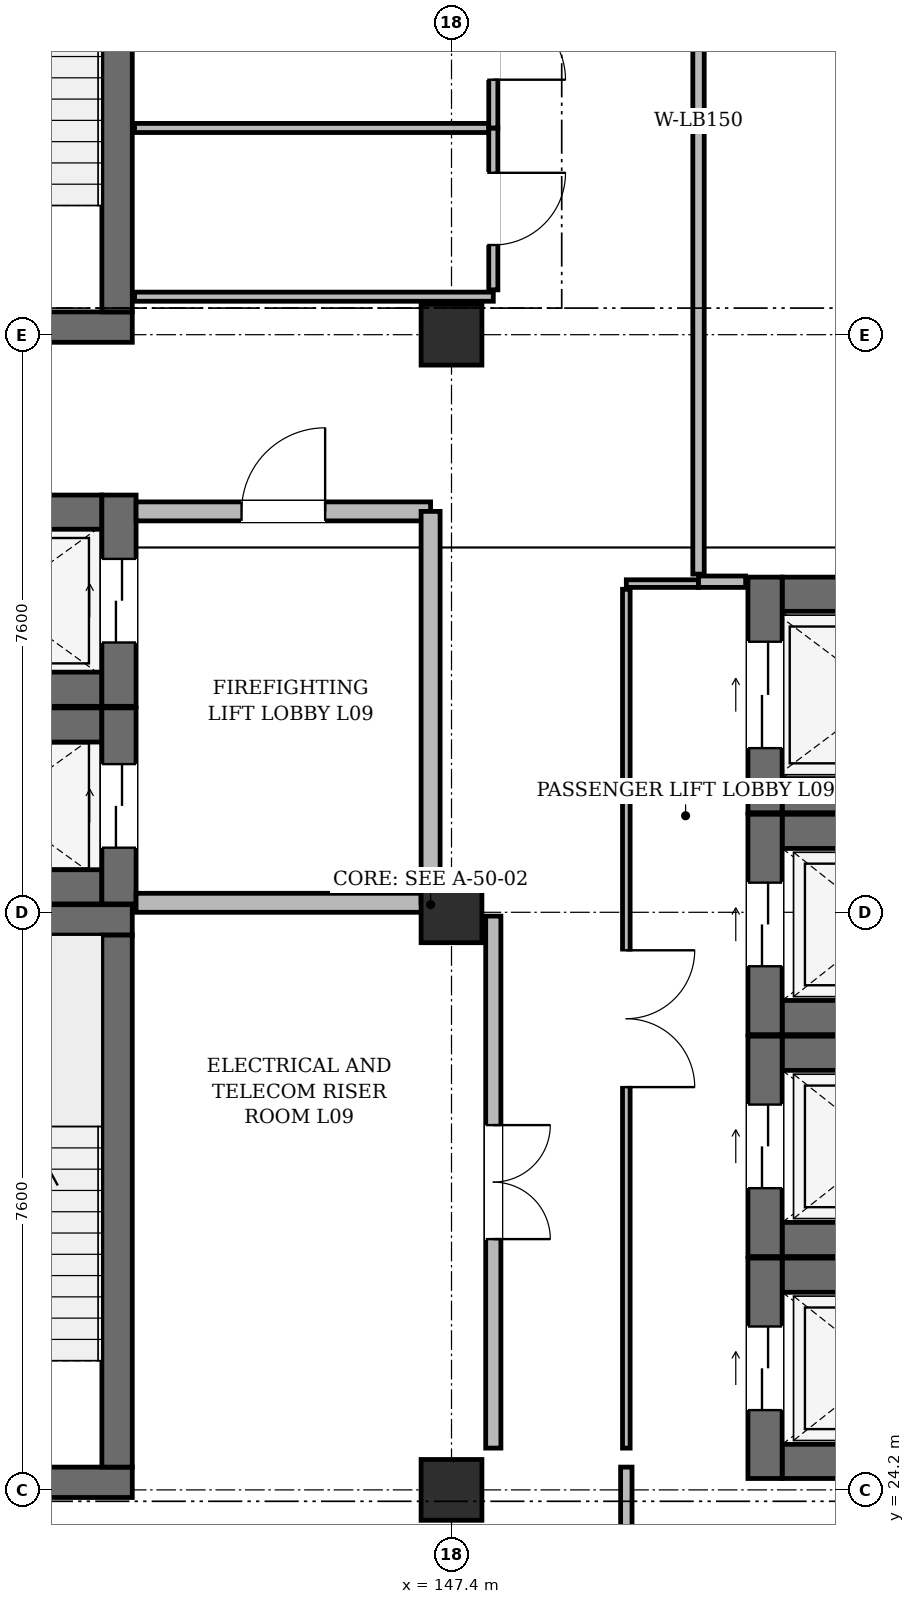
"""IFC4 building model, lengths in metres.
Left out: names, types, materials, properties, quantities, classifications, styles, units other than length and angle.
Written with IfcOpenShell. Run it as: python <this file> out.ifc"""

import sys

from ifc_helpers import new_model, si_unit, direction, frame, frame_2d, origin, origin_2d, place, context, subcontext, project, spatial, rectangle, extrude, element, fill, save


model = new_model("IFC4")
c1 = context("Model", 3, precision=1e-05, world=origin(), true_north=direction((0.0, 1.0)))
c2 = subcontext(c1, "Body", "Model", "MODEL_VIEW")
j1 = project(units=[si_unit("LENGTHUNIT", "METRE"), si_unit("PLANEANGLEUNIT", "RADIAN")], contexts=[c1])
p1 = place(None, origin())
s1 = spatial("IfcSite", under=j1, at=p1, CompositionType="ELEMENT")
p2 = place(p1, origin())
s2 = spatial("IfcBuilding", under=s1, at=p2, CompositionType="ELEMENT")
p3 = place(p2, frame((0.0, 0.0, 40.8)))
s3 = spatial("IfcBuildingStorey", under=s2, at=p3, CompositionType="ELEMENT", Elevation=40.8)
for number, where, z_axis, x_axis in (
    (1, (147.4, 24.2, 0.0), (0.0, 0.0, 1.0), (1.0, 0.0, 0.0)),
    (2, (147.4, 31.8, 0.0), (0.0, 0.0, 1.0), (1.0, 0.0, 0.0)),
    (3, (147.4, 39.4, 0.0), (0.0, 0.0, 1.0), (1.0, 0.0, 0.0)),
):
    element("IfcColumn", number, at=place(p3, frame(where, z_axis=z_axis, x_axis=x_axis)), inside=s3, PredefinedType="COLUMN", context=c2, shape_type="SweptSolid", body=[
        extrude(rectangle(XDim=0.8, YDim=0.8, at=origin_2d()), origin(), (0.0, 0.0, 1.0), 3.94),
    ])
p4 = place(p3, frame((139.4, 24.3, 0.0), z_axis=(0.0, 0.0, 1.0), x_axis=(1.0, 0.0, 0.0)))
e4 = element("IfcWall", 4, at=p4, inside=s3, PredefinedType="SHEAR", context=c2, shape_type="SweptSolid", body=[
    extrude(rectangle(XDim=3.8, YDim=0.4, at=frame_2d((1.9, 0.0))), origin(), (0.0, 0.0, 1.0), 3.94),
])
p5 = place(p4, frame((1.3, 0.0, 0.0)))
e5 = element("IfcOpeningElement", 5, at=p5, cuts=e4, PredefinedType="OPENING", context=c2, shape_type="SweptSolid", body=[
    extrude(rectangle(XDim=1.2, YDim=2.2, at=frame_2d((0.6, 1.1))), frame((0.0, 0.212, 0.0), z_axis=(0.0, -1.0, 0.0), x_axis=(1.0, 0.0, 0.0)), (0.0, 0.0, 1.0), 0.424),
])
p6 = place(p3, frame((139.4, 31.7, 0.0), z_axis=(0.0, 0.0, 1.0), x_axis=(1.0, 0.0, 0.0)))
e6 = element("IfcWall", 6, at=p6, inside=s3, PredefinedType="SHEAR", context=c2, shape_type="SweptSolid", body=[
    extrude(rectangle(XDim=3.8, YDim=0.4, at=frame_2d((1.9, 0.0))), origin(), (0.0, 0.0, 1.0), 3.94),
])
p7 = place(p3, frame((143.0, 24.5, 0.0), z_axis=(0.0, 0.0, 1.0), x_axis=(0.0, 1.0, 0.0)))
e7 = element("IfcWall", 7, at=p7, inside=s3, PredefinedType="SHEAR", context=c2, shape_type="SweptSolid", body=[
    extrude(rectangle(XDim=7.0, YDim=0.4, at=frame_2d((3.5, 0.0))), origin(), (0.0, 0.0, 1.0), 3.94),
])
p8 = place(p3, frame((139.4, 39.5, 0.0), z_axis=(0.0, 0.0, 1.0), x_axis=(1.0, 0.0, 0.0)))
e8 = element("IfcWall", 8, at=p8, inside=s3, PredefinedType="SHEAR", context=c2, shape_type="SweptSolid", body=[
    extrude(rectangle(XDim=3.8, YDim=0.4, at=frame_2d((1.9, 0.0))), origin(), (0.0, 0.0, 1.0), 3.94),
])
p9 = place(p8, frame((1.3, 0.0, 0.0)))
e9 = element("IfcOpeningElement", 9, at=p9, cuts=e8, PredefinedType="OPENING", context=c2, shape_type="SweptSolid", body=[
    extrude(rectangle(XDim=1.2, YDim=2.2, at=frame_2d((0.6, 1.1))), frame((0.0, 0.212, 0.0), z_axis=(0.0, -1.0, 0.0), x_axis=(1.0, 0.0, 0.0)), (0.0, 0.0, 1.0), 0.424),
])
p10 = place(p3, frame((143.0, 39.7, 0.0), z_axis=(0.0, 0.0, 1.0), x_axis=(0.0, 1.0, 0.0)))
e10 = element("IfcWall", 10, at=p10, inside=s3, PredefinedType="SHEAR", context=c2, shape_type="SweptSolid", body=[
    extrude(rectangle(XDim=7.0, YDim=0.4, at=frame_2d((3.5, 0.0))), origin(), (0.0, 0.0, 1.0), 3.94),
])
for number, where, z_axis, x_axis in (
    (11, (140.06, 32.135, 0.0), (0.0, 0.0, 1.0), (1.0, 0.0, 0.0)),
    (12, (140.06, 34.265, 0.0), (0.0, 0.0, 1.0), (1.0, 0.0, 0.0)),
):
    element("IfcWall", number, at=place(p3, frame(where, z_axis=z_axis, x_axis=x_axis)), inside=s3, PredefinedType="SHEAR", context=c2, shape_type="SweptSolid", body=[
        extrude(rectangle(XDim=2.74, YDim=0.45, at=frame_2d((1.37, 0.0))), origin(), (0.0, 0.0, 1.0), 3.94),
    ])
p11 = place(p3, frame((143.025, 31.91, 0.0), z_axis=(0.0, 0.0, 1.0), x_axis=(0.0, 1.0, 0.0)))
e13 = element("IfcWall", 13, at=p11, inside=s3, PredefinedType="SHEAR", context=c2, shape_type="SweptSolid", body=[
    extrude(rectangle(XDim=2.58, YDim=0.45, at=frame_2d((1.29, 0.0))), origin(), (0.0, 0.0, 1.0), 3.94),
])
p12 = place(p11, frame((0.74, 0.0, 0.0)))
e14 = element("IfcOpeningElement", 14, at=p12, cuts=e13, PredefinedType="OPENING", context=c2, shape_type="SweptSolid", body=[
    extrude(rectangle(XDim=1.1, YDim=2.2, at=frame_2d((0.55, 1.1))), frame((0.0, 0.237, 0.0), z_axis=(0.0, -1.0, 0.0), x_axis=(1.0, 0.0, 0.0)), (0.0, 0.0, 1.0), 0.474),
])
for number, where, z_axis, x_axis in (
    (15, (140.06, 34.735, 0.0), (0.0, 0.0, 1.0), (1.0, 0.0, 0.0)),
    (16, (140.06, 37.065, 0.0), (0.0, 0.0, 1.0), (1.0, 0.0, 0.0)),
):
    element("IfcWall", number, at=place(p3, frame(where, z_axis=z_axis, x_axis=x_axis)), inside=s3, PredefinedType="SHEAR", context=c2, shape_type="SweptSolid", body=[
        extrude(rectangle(XDim=2.74, YDim=0.45, at=frame_2d((1.37, 0.0))), origin(), (0.0, 0.0, 1.0), 3.94),
    ])
p13 = place(p3, frame((143.025, 34.51, 0.0), z_axis=(0.0, 0.0, 1.0), x_axis=(0.0, 1.0, 0.0)))
e17 = element("IfcWall", 17, at=p13, inside=s3, PredefinedType="SHEAR", context=c2, shape_type="SweptSolid", body=[
    extrude(rectangle(XDim=2.78, YDim=0.45, at=frame_2d((1.39, 0.0))), origin(), (0.0, 0.0, 1.0), 3.94),
])
p14 = place(p13, frame((0.84, 0.0, 0.0)))
e18 = element("IfcOpeningElement", 18, at=p14, cuts=e17, PredefinedType="OPENING", context=c2, shape_type="SweptSolid", body=[
    extrude(rectangle(XDim=1.1, YDim=2.2, at=frame_2d((0.55, 1.1))), frame((0.0, 0.237, 0.0), z_axis=(0.0, -1.0, 0.0), x_axis=(1.0, 0.0, 0.0)), (0.0, 0.0, 1.0), 0.474),
])
for number, where, z_axis, x_axis in (
    (19, (151.75, 24.575, 0.0), (0.0, 0.0, 1.0), (1.0, 0.0, 0.0)),
    (20, (151.75, 27.025, 0.0), (0.0, 0.0, 1.0), (1.0, 0.0, 0.0)),
):
    element("IfcWall", number, at=place(p3, frame(where, z_axis=z_axis, x_axis=x_axis)), inside=s3, PredefinedType="SHEAR", context=c2, shape_type="SweptSolid", body=[
        extrude(rectangle(XDim=2.7, YDim=0.45, at=frame_2d((1.35, 0.0))), origin(), (0.0, 0.0, 1.0), 3.94),
    ])
p15 = place(p3, frame((151.525, 24.35, 0.0), z_axis=(0.0, 0.0, 1.0), x_axis=(0.0, 1.0, 0.0)))
e21 = element("IfcWall", 21, at=p15, inside=s3, PredefinedType="SHEAR", context=c2, shape_type="SweptSolid", body=[
    extrude(rectangle(XDim=2.9, YDim=0.45, at=frame_2d((1.45, 0.0))), origin(), (0.0, 0.0, 1.0), 3.94),
])
p16 = place(p15, frame((0.9, 0.0, 0.0)))
e22 = element("IfcOpeningElement", 22, at=p16, cuts=e21, PredefinedType="OPENING", context=c2, shape_type="SweptSolid", body=[
    extrude(rectangle(XDim=1.1, YDim=2.2, at=frame_2d((0.55, 1.1))), frame((0.0, 0.237, 0.0), z_axis=(0.0, -1.0, 0.0), x_axis=(1.0, 0.0, 0.0)), (0.0, 0.0, 1.0), 0.474),
])
for number, where, z_axis, x_axis in (
    (23, (151.75, 27.495, 0.0), (0.0, 0.0, 1.0), (1.0, 0.0, 0.0)),
    (24, (151.75, 29.945, 0.0), (0.0, 0.0, 1.0), (1.0, 0.0, 0.0)),
):
    element("IfcWall", number, at=place(p3, frame(where, z_axis=z_axis, x_axis=x_axis)), inside=s3, PredefinedType="SHEAR", context=c2, shape_type="SweptSolid", body=[
        extrude(rectangle(XDim=2.7, YDim=0.45, at=frame_2d((1.35, 0.0))), origin(), (0.0, 0.0, 1.0), 3.94),
    ])
p17 = place(p3, frame((151.525, 27.27, 0.0), z_axis=(0.0, 0.0, 1.0), x_axis=(0.0, 1.0, 0.0)))
e25 = element("IfcWall", 25, at=p17, inside=s3, PredefinedType="SHEAR", context=c2, shape_type="SweptSolid", body=[
    extrude(rectangle(XDim=2.9, YDim=0.45, at=frame_2d((1.45, 0.0))), origin(), (0.0, 0.0, 1.0), 3.94),
])
p18 = place(p17, frame((0.9, 0.0, 0.0)))
e26 = element("IfcOpeningElement", 26, at=p18, cuts=e25, PredefinedType="OPENING", context=c2, shape_type="SweptSolid", body=[
    extrude(rectangle(XDim=1.1, YDim=2.2, at=frame_2d((0.55, 1.1))), frame((0.0, 0.237, 0.0), z_axis=(0.0, -1.0, 0.0), x_axis=(1.0, 0.0, 0.0)), (0.0, 0.0, 1.0), 0.474),
])
for number, where, z_axis, x_axis in (
    (27, (151.75, 30.415, 0.0), (0.0, 0.0, 1.0), (1.0, 0.0, 0.0)),
    (28, (151.75, 32.865, 0.0), (0.0, 0.0, 1.0), (1.0, 0.0, 0.0)),
):
    element("IfcWall", number, at=place(p3, frame(where, z_axis=z_axis, x_axis=x_axis)), inside=s3, PredefinedType="SHEAR", context=c2, shape_type="SweptSolid", body=[
        extrude(rectangle(XDim=2.7, YDim=0.45, at=frame_2d((1.35, 0.0))), origin(), (0.0, 0.0, 1.0), 3.94),
    ])
p19 = place(p3, frame((151.525, 30.19, 0.0), z_axis=(0.0, 0.0, 1.0), x_axis=(0.0, 1.0, 0.0)))
e29 = element("IfcWall", 29, at=p19, inside=s3, PredefinedType="SHEAR", context=c2, shape_type="SweptSolid", body=[
    extrude(rectangle(XDim=2.9, YDim=0.45, at=frame_2d((1.45, 0.0))), origin(), (0.0, 0.0, 1.0), 3.94),
])
p20 = place(p19, frame((0.9, 0.0, 0.0)))
e30 = element("IfcOpeningElement", 30, at=p20, cuts=e29, PredefinedType="OPENING", context=c2, shape_type="SweptSolid", body=[
    extrude(rectangle(XDim=1.1, YDim=2.2, at=frame_2d((0.55, 1.1))), frame((0.0, 0.237, 0.0), z_axis=(0.0, -1.0, 0.0), x_axis=(1.0, 0.0, 0.0)), (0.0, 0.0, 1.0), 0.474),
])
for number, where, z_axis, x_axis in (
    (31, (151.75, 33.335, 0.0), (0.0, 0.0, 1.0), (1.0, 0.0, 0.0)),
    (32, (151.75, 35.985, 0.0), (0.0, 0.0, 1.0), (1.0, 0.0, 0.0)),
):
    element("IfcWall", number, at=place(p3, frame(where, z_axis=z_axis, x_axis=x_axis)), inside=s3, PredefinedType="SHEAR", context=c2, shape_type="SweptSolid", body=[
        extrude(rectangle(XDim=2.7, YDim=0.45, at=frame_2d((1.35, 0.0))), origin(), (0.0, 0.0, 1.0), 3.94),
    ])
p21 = place(p3, frame((151.525, 33.11, 0.0), z_axis=(0.0, 0.0, 1.0), x_axis=(0.0, 1.0, 0.0)))
e33 = element("IfcWall", 33, at=p21, inside=s3, PredefinedType="SHEAR", context=c2, shape_type="SweptSolid", body=[
    extrude(rectangle(XDim=3.1, YDim=0.45, at=frame_2d((1.55, 0.0))), origin(), (0.0, 0.0, 1.0), 3.94),
])
p22 = place(p21, frame((0.85, 0.0, 0.0)))
e34 = element("IfcOpeningElement", 34, at=p22, cuts=e33, PredefinedType="OPENING", context=c2, shape_type="SweptSolid", body=[
    extrude(rectangle(XDim=1.4, YDim=2.3, at=frame_2d((0.7, 1.15))), frame((0.0, 0.237, 0.0), z_axis=(0.0, -1.0, 0.0), x_axis=(1.0, 0.0, 0.0)), (0.0, 0.0, 1.0), 0.474),
])
p23 = place(p3, frame((143.25, 37.075, 0.0), z_axis=(0.0, 0.0, 1.0), x_axis=(1.0, 0.0, 0.0)))
e35 = element("IfcWall", 35, at=p23, inside=s3, PredefinedType="SOLIDWALL", context=c2, shape_type="SweptSolid", body=[
    extrude(rectangle(XDim=3.875, YDim=0.25, at=frame_2d((1.938, 0.0))), origin(), (0.0, 0.0, 1.0), 3.805),
])
p24 = place(p23, frame((1.387, 0.0, 0.0)))
e36 = element("IfcOpeningElement", 36, at=p24, cuts=e35, PredefinedType="OPENING", context=c2, shape_type="SweptSolid", body=[
    extrude(rectangle(XDim=1.1, YDim=2.2, at=frame_2d((0.55, 1.1))), frame((0.0, 0.137, 0.0), z_axis=(0.0, -1.0, 0.0), x_axis=(1.0, 0.0, 0.0)), (0.0, 0.0, 1.0), 0.274),
])
p25 = place(p3, frame((143.25, 31.925, 0.0), z_axis=(0.0, 0.0, 1.0), x_axis=(1.0, 0.0, 0.0)))
e37 = element("IfcWall", 37, at=p25, inside=s3, PredefinedType="SOLIDWALL", context=c2, shape_type="SweptSolid", body=[
    extrude(rectangle(XDim=3.875, YDim=0.25, at=frame_2d((1.938, 0.0))), origin(), (0.0, 0.0, 1.0), 3.275),
])
p26 = place(p3, frame((147.125, 31.925, 0.0), z_axis=(0.0, 0.0, 1.0), x_axis=(0.0, 1.0, 0.0)))
e38 = element("IfcWall", 38, at=p26, inside=s3, PredefinedType="SOLIDWALL", context=c2, shape_type="SweptSolid", body=[
    extrude(rectangle(XDim=5.15, YDim=0.25, at=frame_2d((2.575, 0.0))), origin(), (0.0, 0.0, 1.0), 3.275),
])
p27 = place(p3, frame((143.23, 39.9, 0.0), z_axis=(0.0, 0.0, 1.0), x_axis=(1.0, 0.0, 0.0)))
e39 = element("IfcWall", 39, at=p27, inside=s3, PredefinedType="PARTITIONING", context=c2, shape_type="SweptSolid", body=[
    extrude(rectangle(XDim=4.72, YDim=0.12, at=frame_2d((2.36, 0.0))), origin(), (0.0, 0.0, 1.0), 3.805),
])
p28 = place(p3, frame((147.95, 31.75, 0.0), z_axis=(0.0, 0.0, 1.0), x_axis=(0.0, -1.0, 0.0)))
e40 = element("IfcWall", 40, at=p28, inside=s3, PredefinedType="PARTITIONING", context=c2, shape_type="SweptSolid", body=[
    extrude(rectangle(XDim=7.0, YDim=0.2, at=frame_2d((3.5, 0.0))), origin(), (0.0, 0.0, 1.0), 3.805),
])
p29 = place(p28, frame((2.75, 0.0, 0.0)))
e41 = element("IfcOpeningElement", 41, at=p29, cuts=e40, PredefinedType="OPENING", context=c2, shape_type="SweptSolid", body=[
    extrude(rectangle(XDim=1.5, YDim=2.2, at=frame_2d((0.75, 1.1))), frame((0.0, 0.112, 0.0), z_axis=(0.0, -1.0, 0.0), x_axis=(1.0, 0.0, 0.0)), (0.0, 0.0, 1.0), 0.224),
])
p30 = place(p3, frame((149.7, 24.75, 0.0), z_axis=(0.0, 0.0, 1.0), x_axis=(0.0, 1.0, 0.0)))
e42 = element("IfcWall", 42, at=p30, inside=s3, PredefinedType="PARTITIONING", context=c2, shape_type="SweptSolid", body=[
    extrude(rectangle(XDim=11.3, YDim=0.1, at=frame_2d((5.65, 0.0))), origin(), (0.0, 0.0, 1.0), 3.805),
])
p31 = place(p30, frame((4.75, 0.0, 0.0)))
e43 = element("IfcOpeningElement", 43, at=p31, cuts=e42, PredefinedType="OPENING", context=c2, shape_type="SweptSolid", body=[
    extrude(rectangle(XDim=1.8, YDim=2.4, at=frame_2d((0.9, 1.2))), frame((0.0, 0.062, 0.0), z_axis=(0.0, -1.0, 0.0), x_axis=(1.0, 0.0, 0.0)), (0.0, 0.0, 1.0), 0.124),
])
p32 = place(p3, frame((149.7, 36.125, 0.0), z_axis=(0.0, 0.0, 1.0), x_axis=(1.0, 0.0, 0.0)))
e44 = element("IfcWall", 44, at=p32, inside=s3, PredefinedType="PARTITIONING", context=c2, shape_type="SweptSolid", body=[
    extrude(rectangle(XDim=0.95, YDim=0.1, at=frame_2d((0.475, 0.0))), origin(), (0.0, 0.0, 1.0), 3.805),
])
p33 = place(p3, frame((150.65, 36.15, 0.0), z_axis=(0.0, 0.0, 1.0), x_axis=(1.0, 0.0, 0.0)))
e45 = element("IfcWall", 45, at=p33, inside=s3, PredefinedType="PARTITIONING", context=c2, shape_type="SweptSolid", body=[
    extrude(rectangle(XDim=0.62, YDim=0.15, at=frame_2d((0.31, 0.0))), origin(), (0.0, 0.0, 1.0), 3.805),
])
p34 = place(p3, frame((143.23, 42.12, 0.0), z_axis=(0.0, 0.0, 1.0), x_axis=(1.0, 0.0, 0.0)))
e46 = element("IfcWall", 46, at=p34, inside=s3, PredefinedType="PARTITIONING", context=c2, shape_type="SweptSolid", body=[
    extrude(rectangle(XDim=4.72, YDim=0.12, at=frame_2d((2.36, 0.0))), origin(), (0.0, 0.0, 1.0), 3.415),
])
p35 = place(p3, frame((147.95, 42.12, 0.0), z_axis=(0.0, 0.0, 1.0), x_axis=(0.0, -1.0, 0.0)))
e47 = element("IfcWall", 47, at=p35, inside=s3, PredefinedType="PARTITIONING", context=c2, shape_type="SweptSolid", body=[
    extrude(rectangle(XDim=2.13, YDim=0.12, at=frame_2d((1.065, 0.0))), origin(), (0.0, 0.0, 1.0), 3.805),
])
p36 = place(p35, frame((0.59, 0.0, 0.0)))
e48 = element("IfcOpeningElement", 48, at=p36, cuts=e47, PredefinedType="OPENING", context=c2, shape_type="SweptSolid", body=[
    extrude(rectangle(XDim=0.95, YDim=2.15, at=frame_2d((0.475, 1.075))), frame((0.0, 0.072, 0.0), z_axis=(0.0, -1.0, 0.0), x_axis=(1.0, 0.0, 0.0)), (0.0, 0.0, 1.0), 0.144),
])
p37 = place(p3, frame((147.95, 44.34, 0.0), z_axis=(0.0, 0.0, 1.0), x_axis=(0.0, -1.0, 0.0)))
e49 = element("IfcWall", 49, at=p37, inside=s3, PredefinedType="PARTITIONING", context=c2, shape_type="SweptSolid", body=[
    extrude(rectangle(XDim=2.22, YDim=0.12, at=frame_2d((1.11, 0.0))), origin(), (0.0, 0.0, 1.0), 3.805),
])
p38 = place(p37, frame((0.635, 0.0, 0.0)))
e50 = element("IfcOpeningElement", 50, at=p38, cuts=e49, PredefinedType="OPENING", context=c2, shape_type="SweptSolid", body=[
    extrude(rectangle(XDim=0.95, YDim=2.15, at=frame_2d((0.475, 1.075))), frame((0.0, 0.072, 0.0), z_axis=(0.0, -1.0, 0.0), x_axis=(1.0, 0.0, 0.0)), (0.0, 0.0, 1.0), 0.144),
])
p39 = place(p3, frame((149.7, 24.5, 0.0), z_axis=(0.0, 0.0, 1.0), x_axis=(0.0, -1.0, 0.0)))
e51 = element("IfcWall", 51, at=p39, inside=s3, PredefinedType="PARTITIONING", context=c2, shape_type="SweptSolid", body=[
    extrude(rectangle(XDim=0.8, YDim=0.15, at=frame_2d((0.4, 0.0))), origin(), (0.0, 0.0, 1.0), 3.805),
])
p40 = place(p3, frame((150.65, 62.2, 0.0), z_axis=(0.0, 0.0, 1.0), x_axis=(0.0, -1.0, 0.0)))
e52 = element("IfcWall", 52, at=p40, inside=s3, PredefinedType="PARTITIONING", context=c2, shape_type="SweptSolid", body=[
    extrude(rectangle(XDim=25.95, YDim=0.15, at=frame_2d((12.975, 0.0))), origin(), (0.0, 0.0, 1.0), 3.805),
])
p41 = place(p40, frame((12.275, 0.0, 0.0)))
e53 = element("IfcOpeningElement", 53, at=p41, cuts=e52, PredefinedType="OPENING", context=c2, shape_type="SweptSolid", body=[
    extrude(rectangle(XDim=1.4, YDim=2.2, at=frame_2d((0.7, 1.1))), frame((0.0, 0.087, 0.0), z_axis=(0.0, -1.0, 0.0), x_axis=(1.0, 0.0, 0.0)), (0.0, 0.0, 1.0), 0.174),
])
p42 = place(p12, origin())
e54 = element("IfcDoor", 54, at=p42, inside=s3, OperationType="DOUBLE_DOOR_SLIDING", PredefinedType="DOOR", context=c2, shape_type="SweptSolid", body=[
    extrude(rectangle(XDim=1.1, YDim=2.2, at=frame_2d((0.55, 1.1))), frame((0.0, 0.025, 0.0), z_axis=(0.0, -1.0, 0.0), x_axis=(1.0, 0.0, 0.0)), (0.0, 0.0, 1.0), 0.05),
])
fill(e14, e54)
p43 = place(p14, origin())
e55 = element("IfcDoor", 55, at=p43, inside=s3, OperationType="DOUBLE_DOOR_SLIDING", PredefinedType="DOOR", context=c2, shape_type="SweptSolid", body=[
    extrude(rectangle(XDim=1.1, YDim=2.2, at=frame_2d((0.55, 1.1))), frame((0.0, 0.025, 0.0), z_axis=(0.0, -1.0, 0.0), x_axis=(1.0, 0.0, 0.0)), (0.0, 0.0, 1.0), 0.05),
])
fill(e18, e55)
p44 = place(p16, origin())
e56 = element("IfcDoor", 56, at=p44, inside=s3, OperationType="DOUBLE_DOOR_SLIDING", PredefinedType="DOOR", context=c2, shape_type="SweptSolid", body=[
    extrude(rectangle(XDim=1.1, YDim=2.2, at=frame_2d((0.55, 1.1))), frame((0.0, 0.025, 0.0), z_axis=(0.0, -1.0, 0.0), x_axis=(1.0, 0.0, 0.0)), (0.0, 0.0, 1.0), 0.05),
])
fill(e22, e56)
p45 = place(p18, origin())
e57 = element("IfcDoor", 57, at=p45, inside=s3, OperationType="DOUBLE_DOOR_SLIDING", PredefinedType="DOOR", context=c2, shape_type="SweptSolid", body=[
    extrude(rectangle(XDim=1.1, YDim=2.2, at=frame_2d((0.55, 1.1))), frame((0.0, 0.025, 0.0), z_axis=(0.0, -1.0, 0.0), x_axis=(1.0, 0.0, 0.0)), (0.0, 0.0, 1.0), 0.05),
])
fill(e26, e57)
p46 = place(p20, origin())
e58 = element("IfcDoor", 58, at=p46, inside=s3, OperationType="DOUBLE_DOOR_SLIDING", PredefinedType="DOOR", context=c2, shape_type="SweptSolid", body=[
    extrude(rectangle(XDim=1.1, YDim=2.2, at=frame_2d((0.55, 1.1))), frame((0.0, 0.025, 0.0), z_axis=(0.0, -1.0, 0.0), x_axis=(1.0, 0.0, 0.0)), (0.0, 0.0, 1.0), 0.05),
])
fill(e30, e58)
p47 = place(p22, origin())
e59 = element("IfcDoor", 59, at=p47, inside=s3, OperationType="DOUBLE_DOOR_SLIDING", PredefinedType="DOOR", context=c2, shape_type="SweptSolid", body=[
    extrude(rectangle(XDim=1.4, YDim=2.3, at=frame_2d((0.7, 1.15))), frame((0.0, 0.025, 0.0), z_axis=(0.0, -1.0, 0.0), x_axis=(1.0, 0.0, 0.0)), (0.0, 0.0, 1.0), 0.05),
])
fill(e34, e59)
p48 = place(p24, origin())
e60 = element("IfcDoor", 60, at=p48, inside=s3, OperationType="SINGLE_SWING_RIGHT", PredefinedType="DOOR", context=c2, shape_type="SweptSolid", body=[
    extrude(rectangle(XDim=1.1, YDim=2.2, at=frame_2d((0.55, 1.1))), frame((0.0, 0.025, 0.0), z_axis=(0.0, -1.0, 0.0), x_axis=(1.0, 0.0, 0.0)), (0.0, 0.0, 1.0), 0.05),
])
fill(e36, e60)
p49 = place(p29, origin())
e61 = element("IfcDoor", 61, at=p49, inside=s3, OperationType="DOUBLE_DOOR_SINGLE_SWING", PredefinedType="DOOR", context=c2, shape_type="SweptSolid", body=[
    extrude(rectangle(XDim=1.5, YDim=2.2, at=frame_2d((0.75, 1.1))), frame((0.0, 0.025, 0.0), z_axis=(0.0, -1.0, 0.0), x_axis=(1.0, 0.0, 0.0)), (0.0, 0.0, 1.0), 0.05),
])
fill(e41, e61)
p50 = place(p31, frame((1.8, 0.0, 0.0), z_axis=(0.0, 0.0, 1.0), x_axis=(-1.0, 0.0, 0.0)))
e62 = element("IfcDoor", 62, at=p50, inside=s3, OperationType="DOUBLE_DOOR_SINGLE_SWING", PredefinedType="DOOR", context=c2, shape_type="SweptSolid", body=[
    extrude(rectangle(XDim=1.8, YDim=2.4, at=frame_2d((0.9, 1.2))), frame((0.0, 0.025, 0.0), z_axis=(0.0, -1.0, 0.0), x_axis=(1.0, 0.0, 0.0)), (0.0, 0.0, 1.0), 0.05),
])
fill(e43, e62)
p51 = place(p36, origin())
e63 = element("IfcDoor", 63, at=p51, inside=s3, OperationType="SINGLE_SWING_LEFT", PredefinedType="DOOR", context=c2, shape_type="SweptSolid", body=[
    extrude(rectangle(XDim=0.95, YDim=2.15, at=frame_2d((0.475, 1.075))), frame((0.0, 0.025, 0.0), z_axis=(0.0, -1.0, 0.0), x_axis=(1.0, 0.0, 0.0)), (0.0, 0.0, 1.0), 0.05),
])
fill(e48, e63)
p52 = place(p38, origin())
e64 = element("IfcDoor", 64, at=p52, inside=s3, OperationType="SINGLE_SWING_RIGHT", PredefinedType="DOOR", context=c2, shape_type="SweptSolid", body=[
    extrude(rectangle(XDim=0.95, YDim=2.15, at=frame_2d((0.475, 1.075))), frame((0.0, 0.025, 0.0), z_axis=(0.0, -1.0, 0.0), x_axis=(1.0, 0.0, 0.0)), (0.0, 0.0, 1.0), 0.05),
])
fill(e50, e64)
save(model, sys.argv[1])
